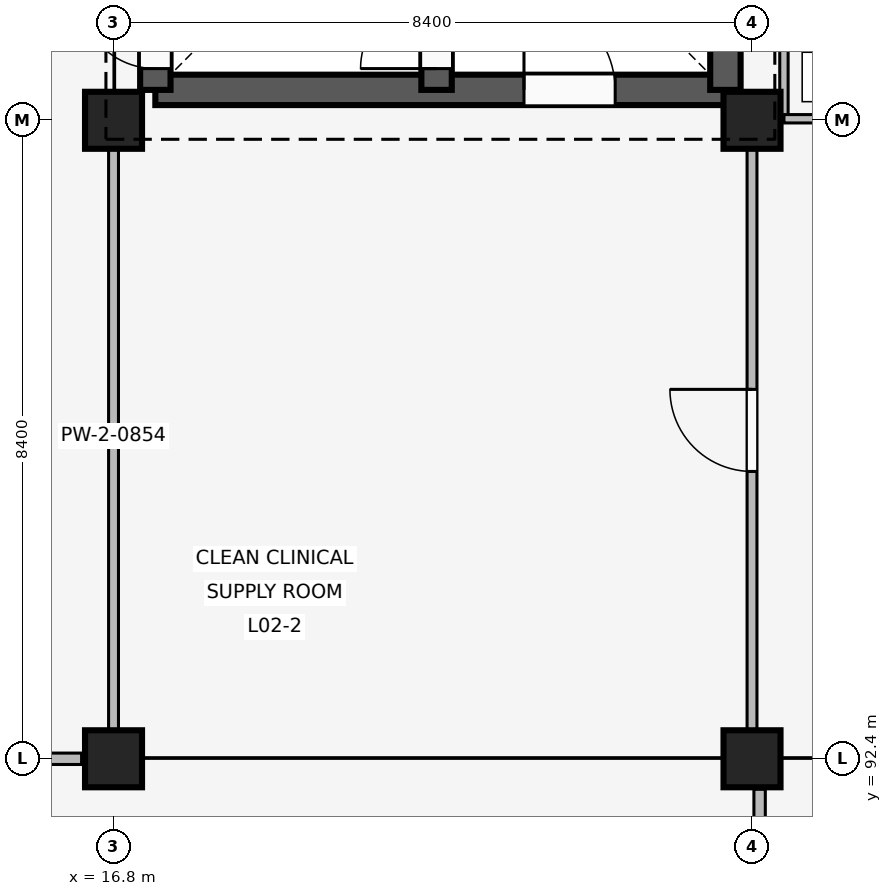
"""IFC4 building model, lengths in metres.
Left out: names, types, materials, properties, quantities, classifications, styles, units other than length and angle.
Written with IfcOpenShell. Run it as: python <this file> out.ifc"""

import sys

from ifc_helpers import new_model, si_unit, direction, frame, frame_2d, origin, origin_2d, place, context, subcontext, project, spatial, rectangle, extrude, element, fill, save


model = new_model("IFC4")
c1 = context("Model", 3, precision=1e-05, world=origin(), true_north=direction((0.0, 1.0)))
c2 = subcontext(c1, "Body", "Model", "MODEL_VIEW")
j1 = project(units=[si_unit("LENGTHUNIT", "METRE"), si_unit("PLANEANGLEUNIT", "RADIAN")], contexts=[c1])
p1 = place(None, origin())
s1 = spatial("IfcSite", under=j1, at=p1, CompositionType="ELEMENT")
p2 = place(p1, origin())
s2 = spatial("IfcBuilding", under=s1, at=p2, CompositionType="ELEMENT")
p3 = place(p2, frame((0.0, 0.0, 8.1)))
s3 = spatial("IfcBuildingStorey", under=s2, at=p3, CompositionType="ELEMENT", Elevation=8.1)
for number, where, z_axis, x_axis in (
    (1, (16.8, 92.4, 0.0), (0.0, 0.0, 1.0), (1.0, 0.0, 0.0)),
    (2, (16.8, 100.8, 0.0), (0.0, 0.0, 1.0), (1.0, 0.0, 0.0)),
    (3, (25.2, 92.4, 0.0), (0.0, 0.0, 1.0), (1.0, 0.0, 0.0)),
    (4, (25.2, 100.8, 0.0), (0.0, 0.0, 1.0), (1.0, 0.0, 0.0)),
):
    element("IfcColumn", number, at=place(p3, frame(where, z_axis=z_axis, x_axis=x_axis)), inside=s3, PredefinedType="COLUMN", context=c2, shape_type="SweptSolid", body=[
        extrude(rectangle(XDim=0.75, YDim=0.75, at=origin_2d()), origin(), (0.0, 0.0, 1.0), 4.8),
    ])
p4 = place(p3, frame((17.35, 101.2, 0.0), z_axis=(0.0, 0.0, 1.0), x_axis=(1.0, 0.0, 0.0)))
e5 = element("IfcWall", 5, at=p4, inside=s3, PredefinedType="SHEAR", context=c2, shape_type="SweptSolid", body=[
    extrude(rectangle(XDim=7.5, YDim=0.4, at=frame_2d((3.75, 0.0))), origin(), (0.0, 0.0, 1.0), 4.52),
])
p5 = place(p4, frame((4.85, 0.0, 0.0)))
e6 = element("IfcOpeningElement", 6, at=p5, cuts=e5, PredefinedType="OPENING", context=c2, shape_type="SweptSolid", body=[
    extrude(rectangle(XDim=1.2, YDim=2.2, at=frame_2d((0.6, 1.1))), frame((0.0, 0.21, 0.0), z_axis=(0.0, -1.0, 0.0), x_axis=(1.0, 0.0, 0.0)), (0.0, 0.0, 1.0), 0.42),
])
p6 = place(p3, frame((17.35, 101.2, 0.0), z_axis=(0.0, 0.0, 1.0), x_axis=(0.0, 1.0, 0.0)))
e7 = element("IfcWall", 7, at=p6, inside=s3, PredefinedType="SHEAR", context=c2, shape_type="SweptSolid", body=[
    extrude(rectangle(XDim=7.55, YDim=0.4, at=frame_2d((3.775, 0.0))), origin(), (0.0, 0.0, 1.0), 4.52),
])
p7 = place(p6, frame((0.28, 0.0, 0.0)))
e8 = element("IfcOpeningElement", 8, at=p7, cuts=e7, PredefinedType="OPENING", context=c2, shape_type="SweptSolid", body=[
    extrude(rectangle(XDim=1.0, YDim=2.15, at=frame_2d((0.5, 1.075))), frame((0.0, 0.21, 0.0), z_axis=(0.0, -1.0, 0.0), x_axis=(1.0, 0.0, 0.0)), (0.0, 0.0, 1.0), 0.42),
])
p8 = place(p3, frame((24.85, 101.2, 0.0), z_axis=(0.0, 0.0, 1.0), x_axis=(0.0, 1.0, 0.0)))
e9 = element("IfcWall", 9, at=p8, inside=s3, PredefinedType="SHEAR", context=c2, shape_type="SweptSolid", body=[
    extrude(rectangle(XDim=7.55, YDim=0.4, at=frame_2d((3.775, 0.0))), origin(), (0.0, 0.0, 1.0), 4.52),
])
p9 = place(p8, frame((2.4, 0.0, 0.0)))
e10 = element("IfcOpeningElement", 10, at=p9, cuts=e9, PredefinedType="OPENING", context=c2, shape_type="SweptSolid", body=[
    extrude(rectangle(XDim=1.2, YDim=2.2, at=frame_2d((0.6, 1.1))), frame((0.0, 0.21, 0.0), z_axis=(0.0, -1.0, 0.0), x_axis=(1.0, 0.0, 0.0)), (0.0, 0.0, 1.0), 0.42),
])
p10 = place(p3, frame((21.05, 101.2, 0.0), z_axis=(0.0, 0.0, 1.0), x_axis=(0.0, 1.0, 0.0)))
e11 = element("IfcWall", 11, at=p10, inside=s3, PredefinedType="SHEAR", context=c2, shape_type="SweptSolid", body=[
    extrude(rectangle(XDim=7.55, YDim=0.4, at=frame_2d((3.775, 0.0))), origin(), (0.0, 0.0, 1.0), 4.52),
])
p11 = place(p10, frame((0.28, 0.0, 0.0)))
e12 = element("IfcOpeningElement", 12, at=p11, cuts=e11, PredefinedType="OPENING", context=c2, shape_type="SweptSolid", body=[
    extrude(rectangle(XDim=1.0, YDim=2.15, at=frame_2d((0.5, 1.075))), frame((0.0, 0.21, 0.0), z_axis=(0.0, -1.0, 0.0), x_axis=(1.0, 0.0, 0.0)), (0.0, 0.0, 1.0), 0.42),
])
p12 = place(p3, frame((16.8, 92.54, 0.0), z_axis=(0.0, 0.0, 1.0), x_axis=(0.0, 1.0, 0.0)))
e13 = element("IfcWall", 13, at=p12, inside=s3, PredefinedType="PARTITIONING", context=c2, shape_type="SweptSolid", body=[
    extrude(rectangle(XDim=8.21, YDim=0.13, at=frame_2d((4.105, 0.0))), origin(), (0.0, 0.0, 1.0), 3.84),
])
p13 = place(p3, frame((25.2, 92.54, 0.0), z_axis=(0.0, 0.0, 1.0), x_axis=(0.0, 1.0, 0.0)))
e14 = element("IfcWall", 14, at=p13, inside=s3, PredefinedType="PARTITIONING", context=c2, shape_type="SweptSolid", body=[
    extrude(rectangle(XDim=8.21, YDim=0.13, at=frame_2d((4.105, 0.0))), origin(), (0.0, 0.0, 1.0), 3.84),
])
p14 = place(p13, frame((3.64, 0.0, 0.0)))
e15 = element("IfcOpeningElement", 15, at=p14, cuts=e14, PredefinedType="OPENING", context=c2, shape_type="SweptSolid", body=[
    extrude(rectangle(XDim=1.08, YDim=2.15, at=frame_2d((0.54, 1.075))), frame((0.0, 0.075, 0.0), z_axis=(0.0, -1.0, 0.0), x_axis=(1.0, 0.0, 0.0)), (0.0, 0.0, 1.0), 0.15),
])
p15 = place(p3, frame((25.62, 100.82, 0.0), z_axis=(0.0, 0.0, 1.0), x_axis=(0.0, 1.0, 0.0)))
e16 = element("IfcWall", 16, at=p15, inside=s3, PredefinedType="PARTITIONING", context=c2, shape_type="SweptSolid", body=[
    extrude(rectangle(XDim=2.61, YDim=0.11, at=frame_2d((1.305, 0.0))), origin(), (0.0, 0.0, 1.0), 3.84),
])
p16 = place(p3, frame((25.62, 100.82, 0.0), z_axis=(0.0, 0.0, 1.0), x_axis=(1.0, 0.0, 0.0)))
e17 = element("IfcWall", 17, at=p16, inside=s3, PredefinedType="PARTITIONING", context=c2, shape_type="SweptSolid", body=[
    extrude(rectangle(XDim=1.98, YDim=0.11, at=frame_2d((0.99, 0.0))), origin(), (0.0, 0.0, 1.0), 3.84),
])
p17 = place(p16, frame((0.54, 0.0, 0.0)))
e18 = element("IfcOpeningElement", 18, at=p17, cuts=e17, PredefinedType="OPENING", context=c2, shape_type="SweptSolid", body=[
    extrude(rectangle(XDim=0.9, YDim=2.1, at=frame_2d((0.45, 1.05))), frame((0.0, 0.065, 0.0), z_axis=(0.0, -1.0, 0.0), x_axis=(1.0, 0.0, 0.0)), (0.0, 0.0, 1.0), 0.13),
])
p18 = place(p3, frame((25.3, 76.0, 0.0), z_axis=(0.0, 0.0, 1.0), x_axis=(0.0, 1.0, 0.0)))
e19 = element("IfcWall", 19, at=p18, inside=s3, PredefinedType="PARTITIONING", context=c2, shape_type="SweptSolid", body=[
    extrude(rectangle(XDim=16.0, YDim=0.15, at=frame_2d((8.0, 0.0))), origin(), (0.0, 0.0, 1.0), 3.84),
])
p19 = place(p18, frame((3.4, 0.0, 0.0)))
e20 = element("IfcOpeningElement", 20, at=p19, cuts=e19, PredefinedType="OPENING", context=c2, shape_type="SweptSolid", body=[
    extrude(rectangle(XDim=1.5, YDim=2.3, at=frame_2d((0.75, 1.15))), frame((0.0, 0.085, 0.0), z_axis=(0.0, -1.0, 0.0), x_axis=(1.0, 0.0, 0.0)), (0.0, 0.0, 1.0), 0.17),
])
p20 = place(p3, frame((0.42, 92.4, 0.0), z_axis=(0.0, 0.0, 1.0), x_axis=(1.0, 0.0, 0.0)))
e21 = element("IfcWall", 21, at=p20, inside=s3, PredefinedType="PARTITIONING", context=c2, shape_type="SweptSolid", body=[
    extrude(rectangle(XDim=15.96, YDim=0.15, at=frame_2d((7.98, 0.0))), origin(), (0.0, 0.0, 1.0), 3.84),
])
p21 = place(p20, frame((3.4, 0.0, 0.0)))
e22 = element("IfcOpeningElement", 22, at=p21, cuts=e21, PredefinedType="OPENING", context=c2, shape_type="SweptSolid", body=[
    extrude(rectangle(XDim=1.5, YDim=2.3, at=frame_2d((0.75, 1.15))), frame((0.0, 0.085, 0.0), z_axis=(0.0, -1.0, 0.0), x_axis=(1.0, 0.0, 0.0)), (0.0, 0.0, 1.0), 0.17),
])
p22 = place(p5, origin())
e23 = element("IfcDoor", 23, at=p22, inside=s3, OperationType="SINGLE_SWING_LEFT", PredefinedType="DOOR", context=c2, shape_type="SweptSolid", body=[
    extrude(rectangle(XDim=1.2, YDim=2.2, at=frame_2d((0.6, 1.1))), frame((0.0, 0.025, 0.0), z_axis=(0.0, -1.0, 0.0), x_axis=(1.0, 0.0, 0.0)), (0.0, 0.0, 1.0), 0.05),
])
fill(e6, e23)
p23 = place(p7, origin())
e24 = element("IfcDoor", 24, at=p23, inside=s3, OperationType="SINGLE_SWING_RIGHT", PredefinedType="DOOR", context=c2, shape_type="SweptSolid", body=[
    extrude(rectangle(XDim=1.0, YDim=2.15, at=frame_2d((0.5, 1.075))), frame((0.0, 0.025, 0.0), z_axis=(0.0, -1.0, 0.0), x_axis=(1.0, 0.0, 0.0)), (0.0, 0.0, 1.0), 0.05),
])
fill(e8, e24)
p24 = place(p11, origin())
e25 = element("IfcDoor", 25, at=p24, inside=s3, OperationType="SINGLE_SWING_LEFT", PredefinedType="DOOR", context=c2, shape_type="SweptSolid", body=[
    extrude(rectangle(XDim=1.0, YDim=2.15, at=frame_2d((0.5, 1.075))), frame((0.0, 0.025, 0.0), z_axis=(0.0, -1.0, 0.0), x_axis=(1.0, 0.0, 0.0)), (0.0, 0.0, 1.0), 0.05),
])
fill(e12, e25)
p25 = place(p14, origin())
e26 = element("IfcDoor", 26, at=p25, inside=s3, OperationType="SINGLE_SWING_RIGHT", PredefinedType="DOOR", context=c2, shape_type="SweptSolid", body=[
    extrude(rectangle(XDim=1.08, YDim=2.15, at=frame_2d((0.54, 1.075))), frame((0.0, 0.025, 0.0), z_axis=(0.0, -1.0, 0.0), x_axis=(1.0, 0.0, 0.0)), (0.0, 0.0, 1.0), 0.05),
])
fill(e15, e26)
save(model, sys.argv[1])
